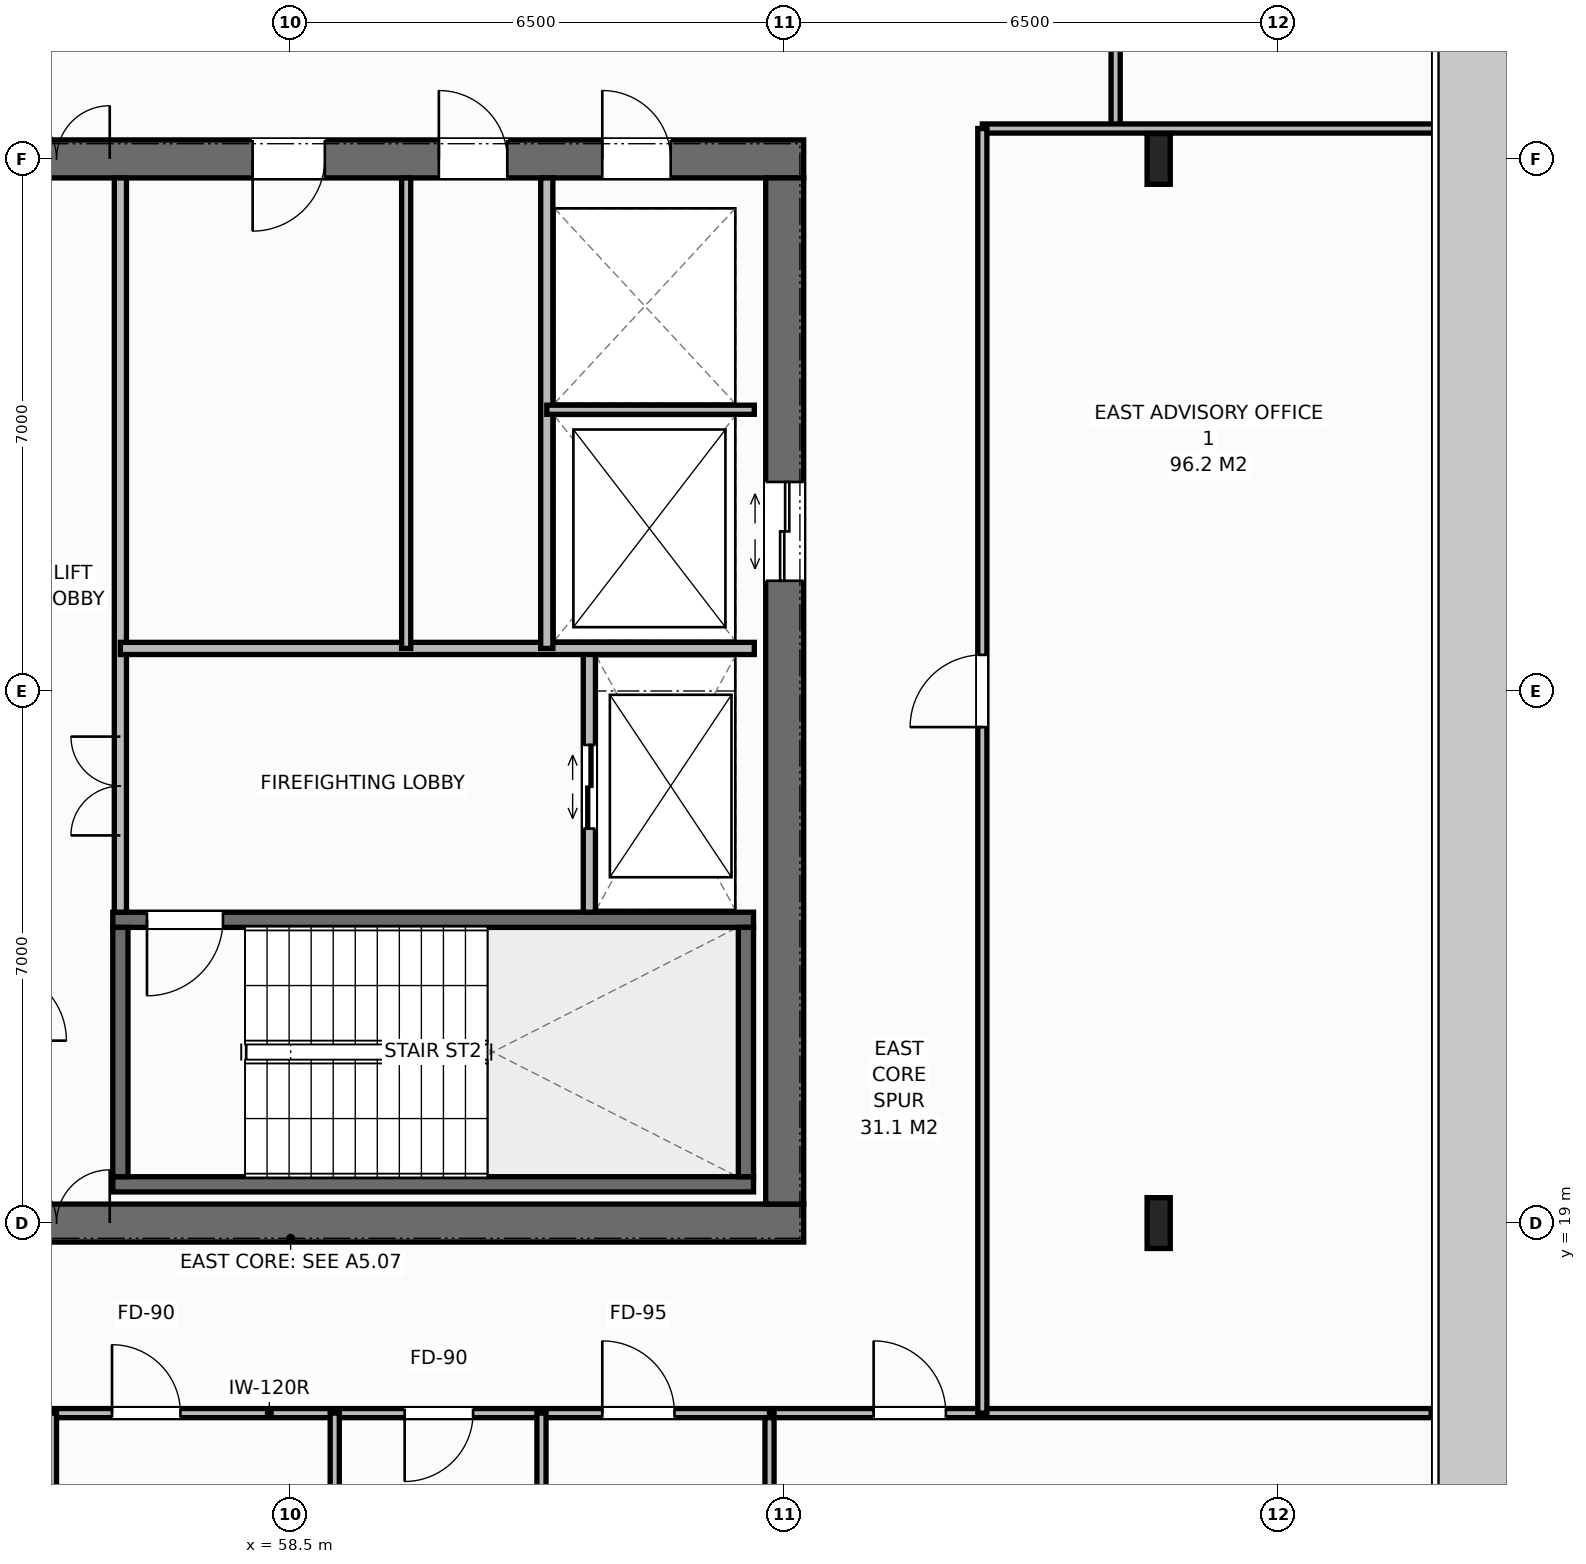
"""IFC4 building model, lengths in metres.
Left out: names, types, materials, properties, quantities, classifications, styles, units other than length and angle.
Written with IfcOpenShell. Run it as: python <this file> out.ifc"""

import sys

from ifc_helpers import new_model, si_unit, direction, frame, frame_2d, origin, origin_2d, place, context, subcontext, project, spatial, rectangle, i_section, extrude, element, fill, save


model = new_model("IFC4")
c1 = context("Model", 3, precision=1e-05, world=origin(), true_north=direction((0.0, 1.0)))
c2 = subcontext(c1, "Body", "Model", "MODEL_VIEW")
j1 = project(units=[si_unit("LENGTHUNIT", "METRE"), si_unit("PLANEANGLEUNIT", "RADIAN")], contexts=[c1])
p1 = place(None, origin())
s1 = spatial("IfcSite", under=j1, at=p1, CompositionType="ELEMENT")
p2 = place(p1, origin())
s2 = spatial("IfcBuilding", under=s1, at=p2, CompositionType="ELEMENT")
p3 = place(p2, frame((0.0, 0.0, 294.4)))
s3 = spatial("IfcBuildingStorey", under=s2, at=p3, CompositionType="ELEMENT", Elevation=294.4)
p4 = place(p3, frame((51.75, 19.0, 0.0), z_axis=(0.0, 0.0, 1.0), x_axis=(1.0, 0.0, 0.0)))
e1 = element("IfcWall", 1, at=p4, inside=s3, PredefinedType="SHEAR", context=c2, shape_type="SweptSolid", body=[
    extrude(rectangle(XDim=13.5, YDim=0.5, at=frame_2d((6.75, 0.0))), origin(), (0.0, 0.0, 1.0), 4.0),
])
p5 = place(p4, frame((2.97, 0.0, 0.0)))
e2 = element("IfcOpeningElement", 2, at=p5, cuts=e1, PredefinedType="OPENING", context=c2, shape_type="SweptSolid", body=[
    extrude(rectangle(XDim=1.4, YDim=2.2, at=frame_2d((0.7, 1.1))), frame((0.0, 0.26, 0.0), z_axis=(0.0, -1.0, 0.0), x_axis=(1.0, 0.0, 0.0)), (0.0, 0.0, 1.0), 0.52),
])
p6 = place(p3, frame((51.75, 33.0, 0.0), z_axis=(0.0, 0.0, 1.0), x_axis=(1.0, 0.0, 0.0)))
e3 = element("IfcWall", 3, at=p6, inside=s3, PredefinedType="SHEAR", context=c2, shape_type="SweptSolid", body=[
    extrude(rectangle(XDim=13.5, YDim=0.5, at=frame_2d((6.75, 0.0))), origin(), (0.0, 0.0, 1.0), 4.0),
])
p7 = place(p6, frame((2.97, 0.0, 0.0)))
e4 = element("IfcOpeningElement", 4, at=p7, cuts=e3, PredefinedType="OPENING", context=c2, shape_type="SweptSolid", body=[
    extrude(rectangle(XDim=1.4, YDim=2.2, at=frame_2d((0.7, 1.1))), frame((0.0, 0.26, 0.0), z_axis=(0.0, -1.0, 0.0), x_axis=(1.0, 0.0, 0.0)), (0.0, 0.0, 1.0), 0.52),
])
p8 = place(p6, frame((10.85, 0.0, 0.0)))
e5 = element("IfcOpeningElement", 5, at=p8, cuts=e3, PredefinedType="OPENING", context=c2, shape_type="SweptSolid", body=[
    extrude(rectangle(XDim=0.9, YDim=2.15, at=frame_2d((0.45, 1.075))), frame((0.0, 0.26, 0.0), z_axis=(0.0, -1.0, 0.0), x_axis=(1.0, 0.0, 0.0)), (0.0, 0.0, 1.0), 0.52),
])
p9 = place(p6, frame((6.25, 0.0, 0.0)))
e6 = element("IfcOpeningElement", 6, at=p9, cuts=e3, PredefinedType="OPENING", context=c2, shape_type="SweptSolid", body=[
    extrude(rectangle(XDim=0.95, YDim=2.15, at=frame_2d((0.475, 1.075))), frame((0.0, 0.26, 0.0), z_axis=(0.0, -1.0, 0.0), x_axis=(1.0, 0.0, 0.0)), (0.0, 0.0, 1.0), 0.52),
])
p10 = place(p6, frame((8.7, 0.0, 0.0)))
e7 = element("IfcOpeningElement", 7, at=p10, cuts=e3, PredefinedType="OPENING", context=c2, shape_type="SweptSolid", body=[
    extrude(rectangle(XDim=0.9, YDim=2.15, at=frame_2d((0.45, 1.075))), frame((0.0, 0.26, 0.0), z_axis=(0.0, -1.0, 0.0), x_axis=(1.0, 0.0, 0.0)), (0.0, 0.0, 1.0), 0.52),
])
p11 = place(p3, frame((65.0, 19.25, 0.0), z_axis=(0.0, 0.0, 1.0), x_axis=(0.0, 1.0, 0.0)))
e8 = element("IfcWall", 8, at=p11, inside=s3, PredefinedType="SHEAR", context=c2, shape_type="SweptSolid", body=[
    extrude(rectangle(XDim=13.5, YDim=0.5, at=frame_2d((6.75, 0.0))), origin(), (0.0, 0.0, 1.0), 4.0),
])
p12 = place(p11, frame((8.2, 0.0, 0.0)))
e9 = element("IfcOpeningElement", 9, at=p12, cuts=e8, PredefinedType="OPENING", context=c2, shape_type="SweptSolid", body=[
    extrude(rectangle(XDim=1.3, YDim=2.2, at=frame_2d((0.65, 1.1))), frame((0.0, 0.26, 0.0), z_axis=(0.0, -1.0, 0.0), x_axis=(1.0, 0.0, 0.0)), (0.0, 0.0, 1.0), 0.52),
])
p13 = place(p3, frame((56.16, 19.51, 0.0), z_axis=(0.0, 0.0, 1.0), x_axis=(1.0, 0.0, 0.0)))
e10 = element("IfcWall", 10, at=p13, inside=s3, PredefinedType="SHEAR", context=c2, shape_type="SweptSolid", body=[
    extrude(rectangle(XDim=8.43, YDim=0.2, at=frame_2d((4.215, 0.0))), origin(), (0.0, 0.0, 1.0), 4.0),
])
p14 = place(p3, frame((56.16, 22.99, 0.0), z_axis=(0.0, 0.0, 1.0), x_axis=(1.0, 0.0, 0.0)))
e11 = element("IfcWall", 11, at=p14, inside=s3, PredefinedType="SHEAR", context=c2, shape_type="SweptSolid", body=[
    extrude(rectangle(XDim=8.43, YDim=0.2, at=frame_2d((4.215, 0.0))), origin(), (0.0, 0.0, 1.0), 4.0),
])
p15 = place(p14, frame((0.45, 0.0, 0.0)))
e12 = element("IfcOpeningElement", 12, at=p15, cuts=e11, PredefinedType="OPENING", context=c2, shape_type="SweptSolid", body=[
    extrude(rectangle(XDim=1.0, YDim=2.15, at=frame_2d((0.5, 1.075))), frame((0.0, 0.11, 0.0), z_axis=(0.0, -1.0, 0.0), x_axis=(1.0, 0.0, 0.0)), (0.0, 0.0, 1.0), 0.22),
])
for number, where, z_axis, x_axis in (
    (13, (56.26, 19.61, 0.0), (0.0, 0.0, 1.0), (0.0, 1.0, 0.0)),
    (14, (64.49, 19.61, 0.0), (0.0, 0.0, 1.0), (0.0, 1.0, 0.0)),
):
    element("IfcWall", number, at=place(p3, frame(where, z_axis=z_axis, x_axis=x_axis)), inside=s3, PredefinedType="SHEAR", context=c2, shape_type="SweptSolid", body=[
        extrude(rectangle(XDim=3.28, YDim=0.2, at=frame_2d((1.64, 0.0))), origin(), (0.0, 0.0, 1.0), 4.0),
    ])
for number, where, z_axis, x_axis in (
    (15, (69.92, 19.0, 0.0), (0.0, 0.0, 1.0), (1.0, 0.0, 0.0)),
    (16, (69.92, 33.0, 0.0), (0.0, 0.0, 1.0), (1.0, 0.0, 0.0)),
):
    element("IfcColumn", number, at=place(p3, frame(where, z_axis=z_axis, x_axis=x_axis)), inside=s3, PredefinedType="COLUMN", context=c2, shape_type="SweptSolid", body=[
        extrude(i_section(OverallWidth=0.305, OverallDepth=0.668, WebThickness=0.021, FlangeThickness=0.04, at=origin_2d()), origin(), (0.0, 0.0, 1.0), 4.0),
    ])
p16 = place(p3, frame((56.26, 23.09, 0.0), z_axis=(0.0, 0.0, 1.0), x_axis=(0.0, 1.0, 0.0)))
e17 = element("IfcWall", 17, at=p16, inside=s3, PredefinedType="STANDARD", context=c2, shape_type="SweptSolid", body=[
    extrude(rectangle(XDim=9.66, YDim=0.16, at=frame_2d((4.83, 0.0))), origin(), (0.0, 0.0, 1.0), 3.788),
])
p17 = place(p16, frame((1.01, 0.0, 0.0)))
e18 = element("IfcOpeningElement", 18, at=p17, cuts=e17, PredefinedType="OPENING", context=c2, shape_type="SweptSolid", body=[
    extrude(rectangle(XDim=1.3, YDim=2.2, at=frame_2d((0.65, 1.1))), frame((0.0, 0.09, 0.0), z_axis=(0.0, -1.0, 0.0), x_axis=(1.0, 0.0, 0.0)), (0.0, 0.0, 1.0), 0.18),
])
p18 = place(p3, frame((62.43, 23.09, 0.0), z_axis=(0.0, 0.0, 1.0), x_axis=(0.0, 1.0, 0.0)))
e19 = element("IfcWall", 19, at=p18, inside=s3, PredefinedType="STANDARD", context=c2, shape_type="SweptSolid", body=[
    extrude(rectangle(XDim=3.47, YDim=0.16, at=frame_2d((1.735, 0.0))), origin(), (0.0, 0.0, 1.0), 3.788),
])
p19 = place(p18, frame((1.1, 0.0, 0.0)))
e20 = element("IfcOpeningElement", 20, at=p19, cuts=e19, PredefinedType="OPENING", context=c2, shape_type="SweptSolid", body=[
    extrude(rectangle(XDim=1.1, YDim=2.2, at=frame_2d((0.55, 1.1))), frame((0.0, 0.09, 0.0), z_axis=(0.0, -1.0, 0.0), x_axis=(1.0, 0.0, 0.0)), (0.0, 0.0, 1.0), 0.18),
])
p20 = place(p3, frame((56.26, 26.56, 0.0), z_axis=(0.0, 0.0, 1.0), x_axis=(1.0, 0.0, 0.0)))
e21 = element("IfcWall", 21, at=p20, inside=s3, PredefinedType="STANDARD", context=c2, shape_type="SweptSolid", body=[
    extrude(rectangle(XDim=8.34, YDim=0.16, at=frame_2d((4.17, 0.0))), origin(), (0.0, 0.0, 1.0), 3.788),
])
p21 = place(p3, frame((61.87, 26.56, 0.0), z_axis=(0.0, 0.0, 1.0), x_axis=(0.0, 1.0, 0.0)))
e22 = element("IfcWall", 22, at=p21, inside=s3, PredefinedType="STANDARD", context=c2, shape_type="SweptSolid", body=[
    extrude(rectangle(XDim=6.19, YDim=0.16, at=frame_2d((3.095, 0.0))), origin(), (0.0, 0.0, 1.0), 3.788),
])
p22 = place(p3, frame((61.87, 29.7, 0.0), z_axis=(0.0, 0.0, 1.0), x_axis=(1.0, 0.0, 0.0)))
e23 = element("IfcWall", 23, at=p22, inside=s3, PredefinedType="PARTITIONING", context=c2, shape_type="SweptSolid", body=[
    extrude(rectangle(XDim=2.73, YDim=0.12, at=frame_2d((1.365, 0.0))), origin(), (0.0, 0.0, 1.0), 3.788),
])
p23 = place(p3, frame((60.02, 26.56, 0.0), z_axis=(0.0, 0.0, 1.0), x_axis=(0.0, 1.0, 0.0)))
e24 = element("IfcWall", 24, at=p23, inside=s3, PredefinedType="PARTITIONING", context=c2, shape_type="SweptSolid", body=[
    extrude(rectangle(XDim=6.19, YDim=0.12, at=frame_2d((3.095, 0.0))), origin(), (0.0, 0.0, 1.0), 3.788),
])
p24 = place(p3, frame((69.354, 33.4, 0.0), z_axis=(0.0, 0.0, 1.0), x_axis=(0.0, 1.0, 0.0)))
e25 = element("IfcWall", 25, at=p24, inside=s3, PredefinedType="PARTITIONING", context=c2, shape_type="SweptSolid", body=[
    extrude(rectangle(XDim=2.1, YDim=0.12, at=frame_2d((1.05, 0.0))), origin(), (0.0, 0.0, 1.0), 3.788),
])
p25 = place(p3, frame((51.64, 16.5, 0.0), z_axis=(0.0, 0.0, 1.0), x_axis=(1.0, 0.0, 0.0)))
e26 = element("IfcWall", 26, at=p25, inside=s3, PredefinedType="PARTITIONING", context=c2, shape_type="SweptSolid", body=[
    extrude(rectangle(XDim=13.16, YDim=0.12, at=frame_2d((6.58, 0.0))), origin(), (0.0, 0.0, 1.0), 3.788),
])
p26 = place(p25, frame((1.51, 0.0, 0.0)))
e27 = element("IfcOpeningElement", 27, at=p26, cuts=e26, PredefinedType="OPENING", context=c2, shape_type="SweptSolid", body=[
    extrude(rectangle(XDim=0.9, YDim=2.15, at=frame_2d((0.45, 1.075))), frame((0.0, 0.07, 0.0), z_axis=(0.0, -1.0, 0.0), x_axis=(1.0, 0.0, 0.0)), (0.0, 0.0, 1.0), 0.14),
])
p27 = place(p25, frame((4.51, 0.0, 0.0)))
e28 = element("IfcOpeningElement", 28, at=p27, cuts=e26, PredefinedType="OPENING", context=c2, shape_type="SweptSolid", body=[
    extrude(rectangle(XDim=0.9, YDim=2.15, at=frame_2d((0.45, 1.075))), frame((0.0, 0.07, 0.0), z_axis=(0.0, -1.0, 0.0), x_axis=(1.0, 0.0, 0.0)), (0.0, 0.0, 1.0), 0.14),
])
p28 = place(p25, frame((8.36, 0.0, 0.0)))
e29 = element("IfcOpeningElement", 29, at=p28, cuts=e26, PredefinedType="OPENING", context=c2, shape_type="SweptSolid", body=[
    extrude(rectangle(XDim=0.9, YDim=2.15, at=frame_2d((0.45, 1.075))), frame((0.0, 0.07, 0.0), z_axis=(0.0, -1.0, 0.0), x_axis=(1.0, 0.0, 0.0)), (0.0, 0.0, 1.0), 0.14),
])
p29 = place(p25, frame((10.96, 0.0, 0.0)))
e30 = element("IfcOpeningElement", 30, at=p29, cuts=e26, PredefinedType="OPENING", context=c2, shape_type="SweptSolid", body=[
    extrude(rectangle(XDim=0.95, YDim=2.15, at=frame_2d((0.475, 1.075))), frame((0.0, 0.07, 0.0), z_axis=(0.0, -1.0, 0.0), x_axis=(1.0, 0.0, 0.0)), (0.0, 0.0, 1.0), 0.14),
])
for number, where, z_axis, x_axis in (
    (31, (55.36, 13.82, 0.0), (0.0, 0.0, 1.0), (0.0, 1.0, 0.0)),
    (32, (59.08, 13.82, 0.0), (0.0, 0.0, 1.0), (0.0, 1.0, 0.0)),
    (33, (61.8, 13.82, 0.0), (0.0, 0.0, 1.0), (0.0, 1.0, 0.0)),
):
    element("IfcWall", number, at=place(p3, frame(where, z_axis=z_axis, x_axis=x_axis)), inside=s3, PredefinedType="PARTITIONING", context=c2, shape_type="SweptSolid", body=[
        extrude(rectangle(XDim=2.68, YDim=0.12, at=frame_2d((1.34, 0.0))), origin(), (0.0, 0.0, 1.0), 3.788),
    ])
p30 = place(p3, frame((64.8, 5.12, 0.0), z_axis=(0.0, 0.0, 1.0), x_axis=(0.0, 1.0, 0.0)))
e34 = element("IfcWall", 34, at=p30, inside=s3, PredefinedType="PARTITIONING", context=c2, shape_type="SweptSolid", body=[
    extrude(rectangle(XDim=11.32, YDim=0.12, at=frame_2d((5.66, 0.0))), origin(), (0.0, 0.0, 1.0), 2.988),
])
p31 = place(p3, frame((64.86, 16.5, 0.0), z_axis=(0.0, 0.0, 1.0), x_axis=(1.0, 0.0, 0.0)))
e35 = element("IfcWall", 35, at=p31, inside=s3, PredefinedType="PARTITIONING", context=c2, shape_type="SweptSolid", body=[
    extrude(rectangle(XDim=8.645, YDim=0.12, at=frame_2d((4.322, 0.0))), origin(), (0.0, 0.0, 1.0), 3.788),
])
p32 = place(p31, frame((1.31, 0.0, 0.0)))
e36 = element("IfcOpeningElement", 36, at=p32, cuts=e35, PredefinedType="OPENING", context=c2, shape_type="SweptSolid", body=[
    extrude(rectangle(XDim=0.95, YDim=2.15, at=frame_2d((0.475, 1.075))), frame((0.0, 0.07, 0.0), z_axis=(0.0, -1.0, 0.0), x_axis=(1.0, 0.0, 0.0)), (0.0, 0.0, 1.0), 0.14),
])
p33 = place(p3, frame((67.6, 33.4, 0.0), z_axis=(0.0, 0.0, 1.0), x_axis=(1.0, 0.0, 0.0)))
e37 = element("IfcWall", 37, at=p33, inside=s3, PredefinedType="PARTITIONING", context=c2, shape_type="SweptSolid", body=[
    extrude(rectangle(XDim=6.065, YDim=0.12, at=frame_2d((3.032, 0.0))), origin(), (0.0, 0.0, 1.0), 3.788),
])
p34 = place(p3, frame((67.6, 16.5, 0.0), z_axis=(0.0, 0.0, 1.0), x_axis=(0.0, 1.0, 0.0)))
e38 = element("IfcWall", 38, at=p34, inside=s3, PredefinedType="PARTITIONING", context=c2, shape_type="SweptSolid", body=[
    extrude(rectangle(XDim=16.9, YDim=0.12, at=frame_2d((8.45, 0.0))), origin(), (0.0, 0.0, 1.0), 3.788),
])
p35 = place(p34, frame((9.025, 0.0, 0.0)))
e39 = element("IfcOpeningElement", 39, at=p35, cuts=e38, PredefinedType="OPENING", context=c2, shape_type="SweptSolid", body=[
    extrude(rectangle(XDim=0.95, YDim=2.15, at=frame_2d((0.475, 1.075))), frame((0.0, 0.07, 0.0), z_axis=(0.0, -1.0, 0.0), x_axis=(1.0, 0.0, 0.0)), (0.0, 0.0, 1.0), 0.14),
])
p36 = place(p5, origin())
e40 = element("IfcDoor", 40, at=p36, inside=s3, OperationType="DOUBLE_DOOR_SINGLE_SWING", PredefinedType="DOOR", context=c2, shape_type="SweptSolid", body=[
    extrude(rectangle(XDim=1.4, YDim=2.2, at=frame_2d((0.7, 1.1))), frame((0.0, 0.075, 0.0), z_axis=(0.0, -1.0, 0.0), x_axis=(1.0, 0.0, 0.0)), (0.0, 0.0, 1.0), 0.05),
])
fill(e2, e40)
p37 = place(p7, origin())
e41 = element("IfcDoor", 41, at=p37, inside=s3, OperationType="DOUBLE_DOOR_SINGLE_SWING", PredefinedType="DOOR", context=c2, shape_type="SweptSolid", body=[
    extrude(rectangle(XDim=1.4, YDim=2.2, at=frame_2d((0.7, 1.1))), frame((0.0, -0.025, 0.0), z_axis=(0.0, -1.0, 0.0), x_axis=(1.0, 0.0, 0.0)), (0.0, 0.0, 1.0), 0.05),
])
fill(e4, e41)
p38 = place(p15, origin())
e42 = element("IfcDoor", 42, at=p38, inside=s3, OperationType="SINGLE_SWING_RIGHT", PredefinedType="DOOR", context=c2, shape_type="SweptSolid", body=[
    extrude(rectangle(XDim=1.0, YDim=2.15, at=frame_2d((0.5, 1.075))), frame((0.0, 0.025, 0.0), z_axis=(0.0, -1.0, 0.0), x_axis=(1.0, 0.0, 0.0)), (0.0, 0.0, 1.0), 0.05),
])
fill(e12, e42)
p39 = place(p19, origin())
e43 = element("IfcDoor", 43, at=p39, inside=s3, OperationType="DOUBLE_DOOR_SLIDING", PredefinedType="DOOR", context=c2, shape_type="SweptSolid", body=[
    extrude(rectangle(XDim=1.1, YDim=2.2, at=frame_2d((0.55, 1.1))), frame((0.0, 0.025, 0.0), z_axis=(0.0, -1.0, 0.0), x_axis=(1.0, 0.0, 0.0)), (0.0, 0.0, 1.0), 0.05),
])
fill(e20, e43)
p40 = place(p17, origin())
e44 = element("IfcDoor", 44, at=p40, inside=s3, OperationType="DOUBLE_DOOR_SINGLE_SWING", PredefinedType="DOOR", context=c2, shape_type="SweptSolid", body=[
    extrude(rectangle(XDim=1.3, YDim=2.2, at=frame_2d((0.65, 1.1))), frame((0.0, 0.025, 0.0), z_axis=(0.0, -1.0, 0.0), x_axis=(1.0, 0.0, 0.0)), (0.0, 0.0, 1.0), 0.05),
])
fill(e18, e44)
p41 = place(p12, origin())
e45 = element("IfcDoor", 45, at=p41, inside=s3, OperationType="DOUBLE_DOOR_SLIDING", PredefinedType="DOOR", context=c2, shape_type="SweptSolid", body=[
    extrude(rectangle(XDim=1.3, YDim=2.2, at=frame_2d((0.65, 1.1))), frame((0.0, 0.025, 0.0), z_axis=(0.0, -1.0, 0.0), x_axis=(1.0, 0.0, 0.0)), (0.0, 0.0, 1.0), 0.05),
])
fill(e9, e45)
p42 = place(p8, origin())
e46 = element("IfcDoor", 46, at=p42, inside=s3, OperationType="SINGLE_SWING_LEFT", PredefinedType="DOOR", context=c2, shape_type="SweptSolid", body=[
    extrude(rectangle(XDim=0.9, YDim=2.15, at=frame_2d((0.45, 1.075))), frame((0.0, -0.025, 0.0), z_axis=(0.0, -1.0, 0.0), x_axis=(1.0, 0.0, 0.0)), (0.0, 0.0, 1.0), 0.05),
])
fill(e5, e46)
p43 = place(p9, origin())
e47 = element("IfcDoor", 47, at=p43, inside=s3, OperationType="SINGLE_SWING_RIGHT", PredefinedType="DOOR", context=c2, shape_type="SweptSolid", body=[
    extrude(rectangle(XDim=0.95, YDim=2.15, at=frame_2d((0.475, 1.075))), frame((0.0, -0.025, 0.0), z_axis=(0.0, -1.0, 0.0), x_axis=(1.0, 0.0, 0.0)), (0.0, 0.0, 1.0), 0.05),
])
fill(e6, e47)
p44 = place(p10, origin())
e48 = element("IfcDoor", 48, at=p44, inside=s3, OperationType="SINGLE_SWING_LEFT", PredefinedType="DOOR", context=c2, shape_type="SweptSolid", body=[
    extrude(rectangle(XDim=0.9, YDim=2.15, at=frame_2d((0.45, 1.075))), frame((0.0, -0.025, 0.0), z_axis=(0.0, -1.0, 0.0), x_axis=(1.0, 0.0, 0.0)), (0.0, 0.0, 1.0), 0.05),
])
fill(e7, e48)
p45 = place(p27, origin())
e49 = element("IfcDoor", 49, at=p45, inside=s3, OperationType="SINGLE_SWING_LEFT", PredefinedType="DOOR", context=c2, shape_type="SweptSolid", body=[
    extrude(rectangle(XDim=0.9, YDim=2.15, at=frame_2d((0.45, 1.075))), frame((0.0, 0.025, 0.0), z_axis=(0.0, -1.0, 0.0), x_axis=(1.0, 0.0, 0.0)), (0.0, 0.0, 1.0), 0.05),
])
fill(e28, e49)
p46 = place(p28, origin())
e50 = element("IfcDoor", 50, at=p46, inside=s3, OperationType="SINGLE_SWING_RIGHT", PredefinedType="DOOR", context=c2, shape_type="SweptSolid", body=[
    extrude(rectangle(XDim=0.9, YDim=2.15, at=frame_2d((0.45, 1.075))), frame((0.0, 0.025, 0.0), z_axis=(0.0, -1.0, 0.0), x_axis=(1.0, 0.0, 0.0)), (0.0, 0.0, 1.0), 0.05),
])
fill(e29, e50)
p47 = place(p29, origin())
e51 = element("IfcDoor", 51, at=p47, inside=s3, OperationType="SINGLE_SWING_LEFT", PredefinedType="DOOR", context=c2, shape_type="SweptSolid", body=[
    extrude(rectangle(XDim=0.95, YDim=2.15, at=frame_2d((0.475, 1.075))), frame((0.0, 0.025, 0.0), z_axis=(0.0, -1.0, 0.0), x_axis=(1.0, 0.0, 0.0)), (0.0, 0.0, 1.0), 0.05),
])
fill(e30, e51)
p48 = place(p32, origin())
e52 = element("IfcDoor", 52, at=p48, inside=s3, OperationType="SINGLE_SWING_LEFT", PredefinedType="DOOR", context=c2, shape_type="SweptSolid", body=[
    extrude(rectangle(XDim=0.95, YDim=2.15, at=frame_2d((0.475, 1.075))), frame((0.0, 0.025, 0.0), z_axis=(0.0, -1.0, 0.0), x_axis=(1.0, 0.0, 0.0)), (0.0, 0.0, 1.0), 0.05),
])
fill(e36, e52)
p49 = place(p35, origin())
e53 = element("IfcDoor", 53, at=p49, inside=s3, OperationType="SINGLE_SWING_LEFT", PredefinedType="DOOR", context=c2, shape_type="SweptSolid", body=[
    extrude(rectangle(XDim=0.95, YDim=2.15, at=frame_2d((0.475, 1.075))), frame((0.0, 0.025, 0.0), z_axis=(0.0, -1.0, 0.0), x_axis=(1.0, 0.0, 0.0)), (0.0, 0.0, 1.0), 0.05),
])
fill(e39, e53)
save(model, sys.argv[1])
